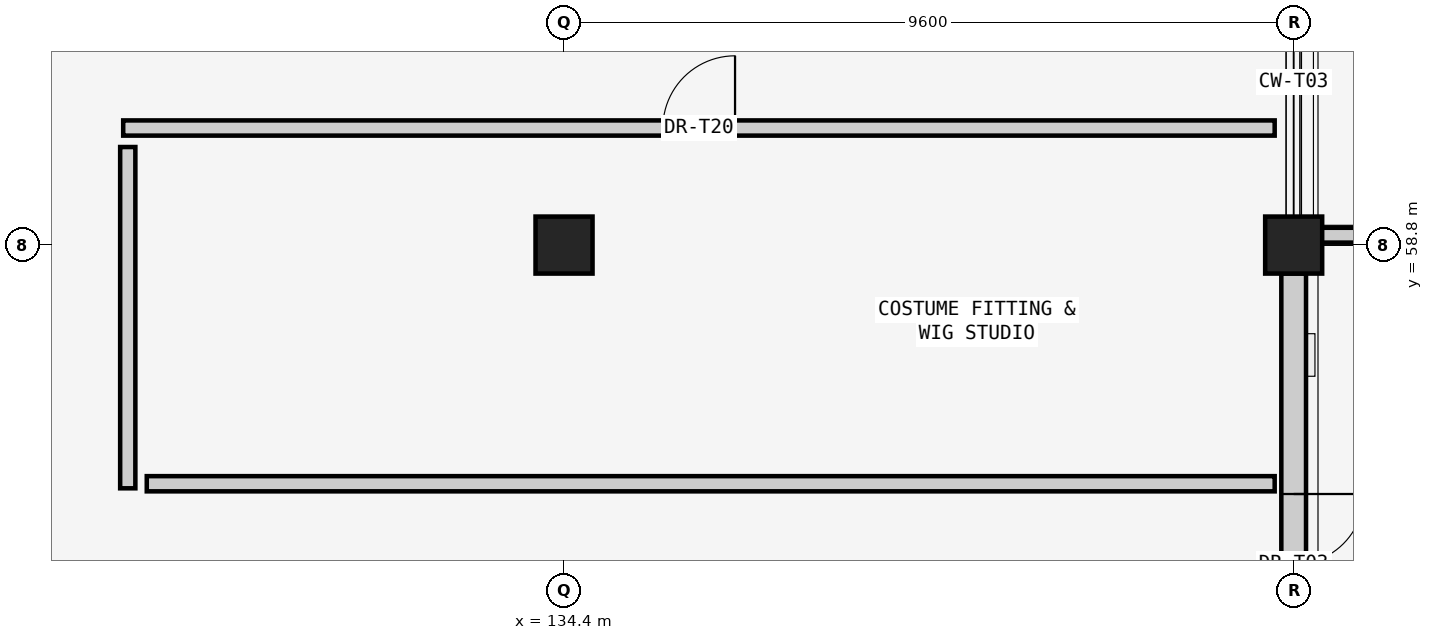
"""IFC4 building model, lengths in metres.
Left out: names, types, materials, properties, quantities, classifications, styles, units other than length and angle.
Written with IfcOpenShell. Run it as: python <this file> out.ifc"""

import sys

from ifc_helpers import new_model, si_unit, direction, frame, frame_2d, origin, origin_2d, place, context, subcontext, project, spatial, rectangle, extrude, element, fill, save


model = new_model("IFC4")
c1 = context("Model", 3, precision=1e-05, world=origin(), true_north=direction((0.0, 1.0)))
c2 = subcontext(c1, "Body", "Model", "MODEL_VIEW")
j1 = project(units=[si_unit("LENGTHUNIT", "METRE"), si_unit("PLANEANGLEUNIT", "RADIAN")], contexts=[c1])
p1 = place(None, origin())
s1 = spatial("IfcSite", under=j1, at=p1, CompositionType="ELEMENT")
p2 = place(p1, origin())
s2 = spatial("IfcBuilding", under=s1, at=p2, CompositionType="ELEMENT")
p3 = place(p2, frame((0.0, 0.0, 10.2)))
s3 = spatial("IfcBuildingStorey", under=s2, at=p3, CompositionType="ELEMENT", Elevation=10.2)
for number, where, z_axis, x_axis in (
    (1, (134.4, 58.8, 0.0), (0.0, 0.0, 1.0), (1.0, 0.0, 0.0)),
    (2, (144.0, 58.8, 0.0), (0.0, 0.0, 1.0), (1.0, 0.0, 0.0)),
):
    element("IfcColumn", number, at=place(p3, frame(where, z_axis=z_axis, x_axis=x_axis)), inside=s3, PredefinedType="COLUMN", context=c2, shape_type="SweptSolid", body=[
        extrude(rectangle(XDim=0.75, YDim=0.75, at=origin_2d()), origin(), (0.0, 0.0, 1.0), 4.56),
    ])
p4 = place(p3, frame((144.0, 58.425, 0.0), z_axis=(0.0, 0.0, 1.0), x_axis=(0.0, -1.0, 0.0)))
e3 = element("IfcWall", 3, at=p4, inside=s3, PredefinedType="SOLIDWALL", context=c2, shape_type="SweptSolid", body=[
    extrude(rectangle(XDim=7.65, YDim=0.325, at=frame_2d((3.825, 0.0))), origin(), (0.0, 0.0, 1.0), 4.208),
])
p5 = place(p4, frame((2.9, 0.0, 0.0)))
e4 = element("IfcOpeningElement", 4, at=p5, cuts=e3, PredefinedType="OPENING", context=c2, shape_type="SweptSolid", body=[
    extrude(rectangle(XDim=1.85, YDim=2.3, at=frame_2d((0.925, 1.15))), frame((0.0, 0.172, 0.0), z_axis=(0.0, -1.0, 0.0), x_axis=(1.0, 0.0, 0.0)), (0.0, 0.0, 1.0), 0.345),
])
p6 = place(p3, frame((153.44, 58.93, 0.0), z_axis=(0.0, 0.0, 1.0), x_axis=(-1.0, 0.0, 0.0)))
e5 = element("IfcWall", 5, at=p6, inside=s3, PredefinedType="PARAPET", context=c2, shape_type="SweptSolid", body=[
    extrude(rectangle(XDim=9.28, YDim=0.195, at=frame_2d((4.64, 0.0))), origin(), (0.0, 0.0, 1.0), 1.15),
])
p7 = place(p3, frame((128.6, 60.34, 0.0), z_axis=(0.0, 0.0, 1.0), x_axis=(1.0, 0.0, 0.0)))
e6 = element("IfcWall", 6, at=p7, inside=s3, PredefinedType="SOLIDWALL", context=c2, shape_type="SweptSolid", body=[
    extrude(rectangle(XDim=15.15, YDim=0.2, at=frame_2d((7.575, 0.0))), origin(), (0.0, 0.0, 1.0), 4.48),
])
p8 = place(p7, frame((7.1, 0.0, 0.0)))
e7 = element("IfcOpeningElement", 7, at=p8, cuts=e6, PredefinedType="OPENING", context=c2, shape_type="SweptSolid", body=[
    extrude(rectangle(XDim=0.95, YDim=2.15, at=frame_2d((0.475, 1.075))), frame((0.0, 0.11, 0.0), z_axis=(0.0, -1.0, 0.0), x_axis=(1.0, 0.0, 0.0)), (0.0, 0.0, 1.0), 0.22),
])
p9 = place(p3, frame((128.66, 55.6, 0.0), z_axis=(0.0, 0.0, 1.0), x_axis=(0.0, 1.0, 0.0)))
e8 = element("IfcWall", 8, at=p9, inside=s3, PredefinedType="SOLIDWALL", context=c2, shape_type="SweptSolid", body=[
    extrude(rectangle(XDim=4.49, YDim=0.2, at=frame_2d((2.245, 0.0))), origin(), (0.0, 0.0, 1.0), 4.48),
])
p10 = place(p3, frame((128.91, 55.66, 0.0), z_axis=(0.0, 0.0, 1.0), x_axis=(1.0, 0.0, 0.0)))
e9 = element("IfcWall", 9, at=p10, inside=s3, PredefinedType="SOLIDWALL", context=c2, shape_type="SweptSolid", body=[
    extrude(rectangle(XDim=14.84, YDim=0.2, at=frame_2d((7.42, 0.0))), origin(), (0.0, 0.0, 1.0), 4.48),
])
p11 = place(p5, origin())
e10 = element("IfcDoor", 10, at=p11, inside=s3, OperationType="DOUBLE_DOOR_SINGLE_SWING", PredefinedType="DOOR", context=c2, shape_type="SweptSolid", body=[
    extrude(rectangle(XDim=1.85, YDim=2.3, at=frame_2d((0.925, 1.15))), frame((0.0, 0.025, 0.0), z_axis=(0.0, -1.0, 0.0), x_axis=(1.0, 0.0, 0.0)), (0.0, 0.0, 1.0), 0.05),
])
fill(e4, e10)
p12 = place(p8, origin())
e11 = element("IfcDoor", 11, at=p12, inside=s3, OperationType="SINGLE_SWING_RIGHT", PredefinedType="DOOR", context=c2, shape_type="SweptSolid", body=[
    extrude(rectangle(XDim=0.95, YDim=2.15, at=frame_2d((0.475, 1.075))), frame((0.0, 0.025, 0.0), z_axis=(0.0, -1.0, 0.0), x_axis=(1.0, 0.0, 0.0)), (0.0, 0.0, 1.0), 0.05),
])
fill(e7, e11)
save(model, sys.argv[1])
